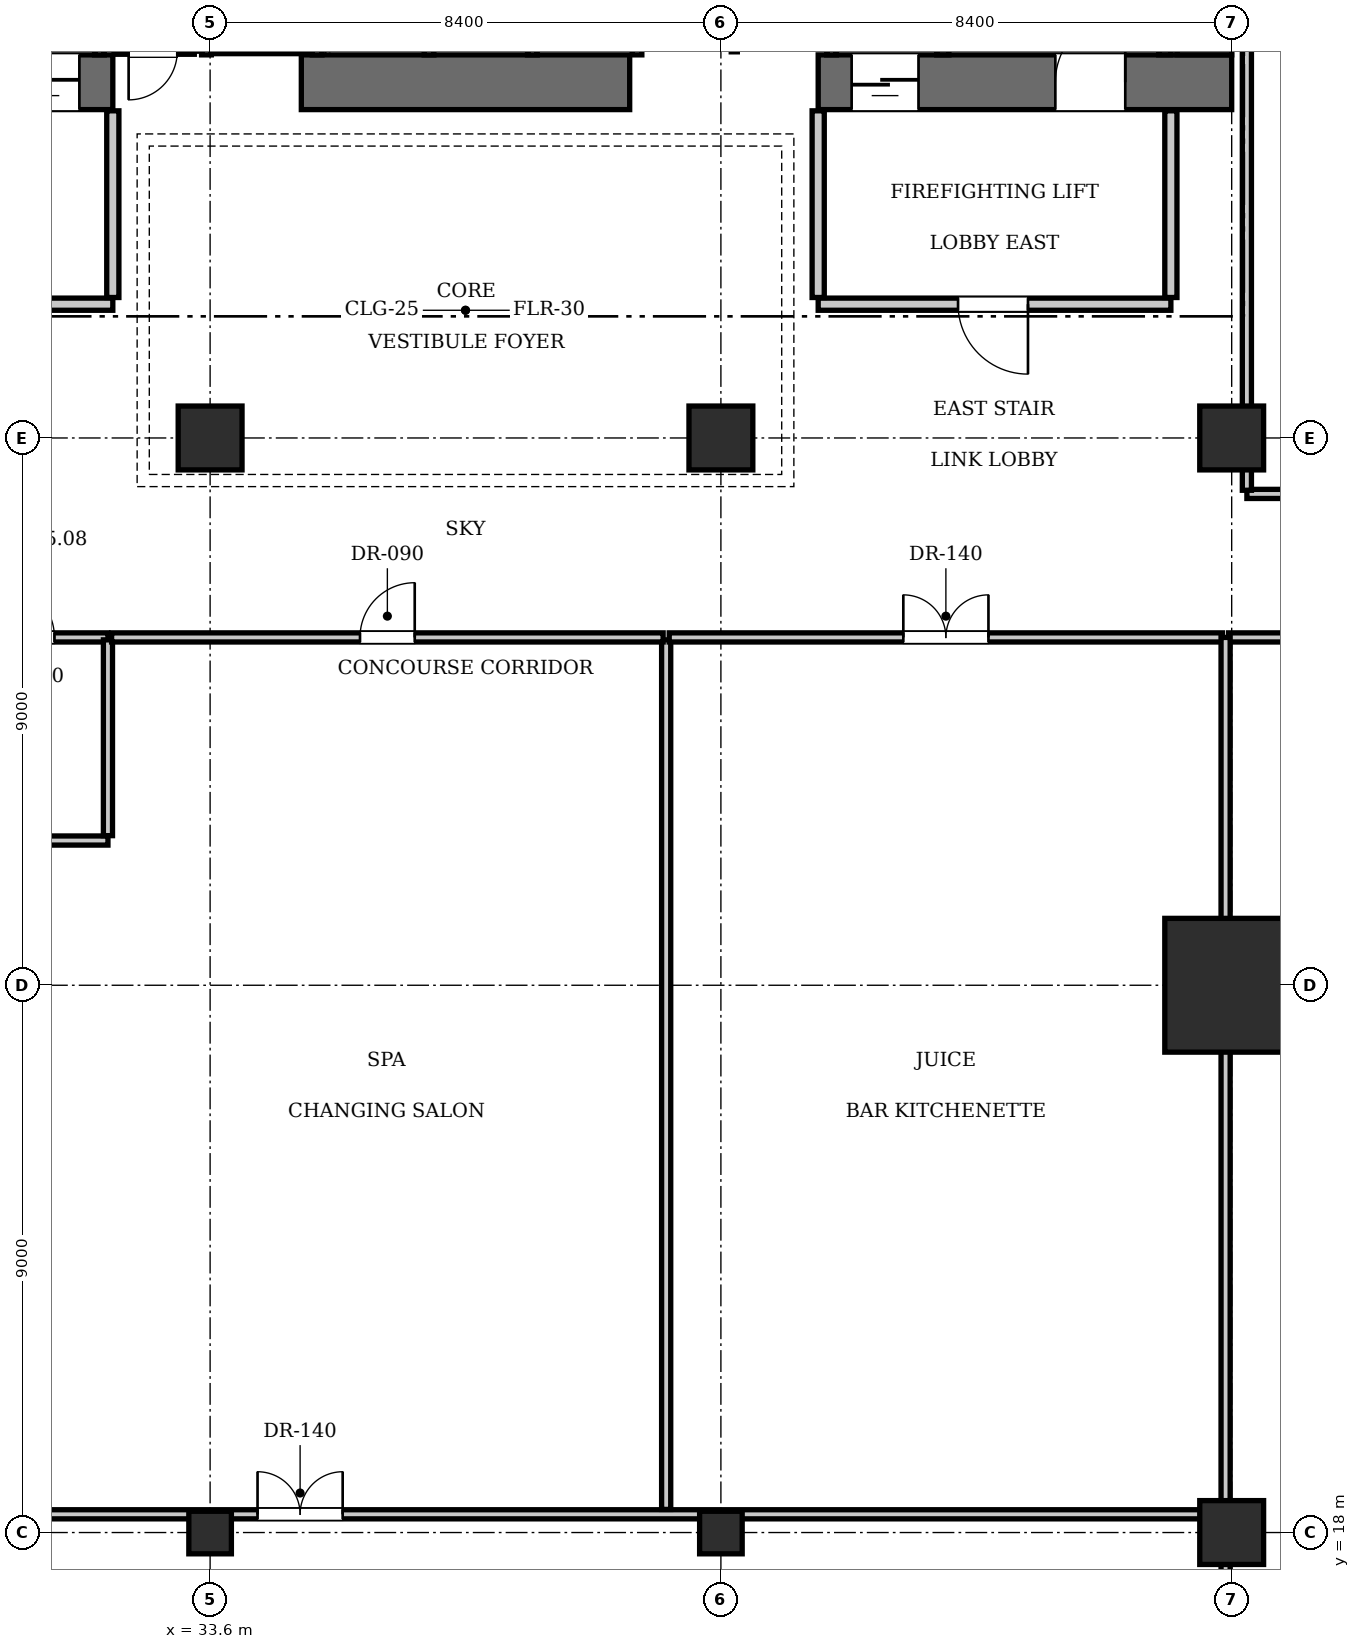
"""IFC4 building model, lengths in metres.
Left out: names, types, materials, properties, quantities, classifications, styles, units other than length and angle.
Written with IfcOpenShell. Run it as: python <this file> out.ifc"""

import sys

from ifc_helpers import new_model, si_unit, direction, frame, frame_2d, origin, origin_2d, place, context, subcontext, project, spatial, rectangle, i_section, extrude, element, fill, save


model = new_model("IFC4")
c1 = context("Model", 3, precision=1e-05, world=origin(), true_north=direction((0.0, 1.0)))
c2 = subcontext(c1, "Body", "Model", "MODEL_VIEW")
j1 = project(units=[si_unit("LENGTHUNIT", "METRE"), si_unit("PLANEANGLEUNIT", "RADIAN")], contexts=[c1])
p1 = place(None, origin())
s1 = spatial("IfcSite", under=j1, at=p1, CompositionType="ELEMENT")
p2 = place(p1, origin())
s2 = spatial("IfcBuilding", under=s1, at=p2, CompositionType="ELEMENT")
p3 = place(p2, frame((0.0, 0.0, 26.95)))
s3 = spatial("IfcBuildingStorey", under=s2, at=p3, CompositionType="ELEMENT", Elevation=26.95)
p4 = place(p3, frame((50.4, 27.0, 0.0), z_axis=(0.0, 0.0, 1.0), x_axis=(1.0, 0.0, 0.0)))
e1 = element("IfcColumn", 1, at=p4, inside=s3, PredefinedType="COLUMN", context=c2, shape_type="SweptSolid", body=[
    extrude(rectangle(XDim=2.2, YDim=2.2, at=origin_2d()), origin(), (0.0, 0.0, 1.0), 3.85),
])
p5 = place(p3, frame((25.2, 41.85, 0.0), z_axis=(0.0, 0.0, 1.0), x_axis=(1.0, 0.0, 0.0)))
e2 = element("IfcWall", 2, at=p5, inside=s3, PredefinedType="SHEAR", context=c2, shape_type="SweptSolid", body=[
    extrude(rectangle(XDim=6.8, YDim=0.9, at=frame_2d((3.4, 0.0))), origin(), (0.0, 0.0, 1.0), 3.85),
])
p6 = place(p5, frame((1.65, 0.0, 0.0)))
e3 = element("IfcOpeningElement", 3, at=p6, cuts=e2, PredefinedType="OPENING", context=c2, shape_type="SweptSolid", body=[
    extrude(rectangle(XDim=1.15, YDim=2.15, at=frame_2d((0.575, 1.075))), frame((0.0, 0.46, 0.0), z_axis=(0.0, -1.0, 0.0), x_axis=(1.0, 0.0, 0.0)), (0.0, 0.0, 1.0), 0.92),
])
p7 = place(p5, frame((5.15, 0.0, 0.0)))
e4 = element("IfcOpeningElement", 4, at=p7, cuts=e2, PredefinedType="OPENING", context=c2, shape_type="SweptSolid", body=[
    extrude(rectangle(XDim=1.1, YDim=2.2, at=frame_2d((0.55, 1.1))), frame((0.0, 0.46, 0.0), z_axis=(0.0, -1.0, 0.0), x_axis=(1.0, 0.0, 0.0)), (0.0, 0.0, 1.0), 0.92),
])
p8 = place(p3, frame((35.1, 41.85, 0.0), z_axis=(0.0, 0.0, 1.0), x_axis=(1.0, 0.0, 0.0)))
e5 = element("IfcWall", 5, at=p8, inside=s3, PredefinedType="SHEAR", context=c2, shape_type="SweptSolid", body=[
    extrude(rectangle(XDim=5.4, YDim=0.9, at=frame_2d((2.7, 0.0))), origin(), (0.0, 0.0, 1.0), 3.85),
])
p9 = place(p3, frame((43.6, 41.85, 0.0), z_axis=(0.0, 0.0, 1.0), x_axis=(1.0, 0.0, 0.0)))
e6 = element("IfcWall", 6, at=p9, inside=s3, PredefinedType="SHEAR", context=c2, shape_type="SweptSolid", body=[
    extrude(rectangle(XDim=6.8, YDim=0.9, at=frame_2d((3.4, 0.0))), origin(), (0.0, 0.0, 1.0), 3.85),
])
p10 = place(p9, frame((3.9, 0.0, 0.0)))
e7 = element("IfcOpeningElement", 7, at=p10, cuts=e6, PredefinedType="OPENING", context=c2, shape_type="SweptSolid", body=[
    extrude(rectangle(XDim=1.15, YDim=2.15, at=frame_2d((0.575, 1.075))), frame((0.0, 0.46, 0.0), z_axis=(0.0, -1.0, 0.0), x_axis=(1.0, 0.0, 0.0)), (0.0, 0.0, 1.0), 0.92),
])
p11 = place(p9, frame((0.55, 0.0, 0.0)))
e8 = element("IfcOpeningElement", 8, at=p11, cuts=e6, PredefinedType="OPENING", context=c2, shape_type="SweptSolid", body=[
    extrude(rectangle(XDim=1.1, YDim=2.2, at=frame_2d((0.55, 1.1))), frame((0.0, 0.46, 0.0), z_axis=(0.0, -1.0, 0.0), x_axis=(1.0, 0.0, 0.0)), (0.0, 0.0, 1.0), 0.92),
])
p12 = place(p3, frame((49.95, 42.3, 0.0), z_axis=(0.0, 0.0, 1.0), x_axis=(0.0, 1.0, 0.0)))
e9 = element("IfcWall", 9, at=p12, inside=s3, PredefinedType="SHEAR", context=c2, shape_type="SweptSolid", body=[
    extrude(rectangle(XDim=1.6, YDim=0.9, at=frame_2d((0.8, 0.0))), origin(), (0.0, 0.0, 1.0), 3.85),
])
for number, where, z_axis, x_axis in (
    (10, (33.6, 36.0, 0.0), (0.0, 0.0, 1.0), (1.0, 0.0, 0.0)),
    (11, (42.0, 36.0, 0.0), (0.0, 0.0, 1.0), (1.0, 0.0, 0.0)),
    (12, (50.4, 36.0, 0.0), (0.0, 0.0, 1.0), (1.0, 0.0, 0.0)),
    (13, (50.4, 18.0, 0.0), (0.0, 0.0, 1.0), (1.0, 0.0, 0.0)),
):
    element("IfcColumn", number, at=place(p3, frame(where, z_axis=z_axis, x_axis=x_axis)), inside=s3, PredefinedType="COLUMN", context=c2, shape_type="SweptSolid", body=[
        extrude(rectangle(XDim=1.05, YDim=1.05, at=origin_2d()), origin(), (0.0, 0.0, 1.0), 3.85),
    ])
for number, where, z_axis, x_axis in (
    (14, (33.6, 18.0, -0.24), (0.0, 0.0, 1.0), (1.0, 0.0, 0.0)),
    (15, (42.0, 18.0, -0.24), (0.0, 0.0, 1.0), (1.0, 0.0, 0.0)),
):
    element("IfcColumn", number, at=place(p3, frame(where, z_axis=z_axis, x_axis=x_axis)), inside=s3, PredefinedType="COLUMN", context=c2, shape_type="SweptSolid", body=[
        extrude(i_section(OverallWidth=0.7, OverallDepth=0.7, WebThickness=0.028, FlangeThickness=0.044, at=origin_2d()), origin(), (0.0, 0.0, 1.0), 4.09),
    ])
p13 = place(p3, frame((45.65, 42.3, 0.0), z_axis=(0.0, 0.0, 1.0), x_axis=(0.0, 1.0, 0.0)))
e16 = element("IfcWall", 16, at=p13, inside=s3, PredefinedType="SOLIDWALL", context=c2, shape_type="SweptSolid", body=[
    extrude(rectangle(XDim=8.85, YDim=0.2, at=frame_2d((4.425, 0.0))), origin(), (0.0, 0.0, 1.0), 3.61),
])
p14 = place(p3, frame((49.3, 42.3, 0.0), z_axis=(0.0, 0.0, 1.0), x_axis=(0.0, 1.0, 0.0)))
e17 = element("IfcWall", 17, at=p14, inside=s3, PredefinedType="SOLIDWALL", context=c2, shape_type="SweptSolid", body=[
    extrude(rectangle(XDim=1.58, YDim=0.2, at=frame_2d((0.79, 0.0))), origin(), (0.0, 0.0, 1.0), 3.61),
])
for number, where, z_axis, x_axis in (
    (18, (31.78, 42.3, 0.0), (0.0, 0.0, 1.0), (0.0, 1.0, 0.0)),
    (19, (43.82, 42.3, 0.0), (0.0, 0.0, 1.0), (0.0, 1.0, 0.0)),
):
    element("IfcWall", number, at=place(p3, frame(where, z_axis=z_axis, x_axis=x_axis)), inside=s3, PredefinedType="SOLIDWALL", context=c2, shape_type="SweptSolid", body=[
        extrude(rectangle(XDim=2.44, YDim=0.16, at=frame_2d((1.22, 0.0))), origin(), (0.0, 0.0, 1.0), 3.61),
    ])
for number, where, z_axis, x_axis in (
    (20, (37.2, 42.3, 0.0), (0.0, 0.0, 1.0), (0.0, 1.0, 0.0)),
    (21, (38.9, 42.3, 0.0), (0.0, 0.0, 1.0), (0.0, 1.0, 0.0)),
    (22, (40.62, 42.3, 0.0), (0.0, 0.0, 1.0), (0.0, 1.0, 0.0)),
):
    element("IfcWall", number, at=place(p3, frame(where, z_axis=z_axis, x_axis=x_axis)), inside=s3, PredefinedType="SOLIDWALL", context=c2, shape_type="SweptSolid", body=[
        extrude(rectangle(XDim=2.05, YDim=0.16, at=frame_2d((1.025, 0.0))), origin(), (0.0, 0.0, 1.0), 3.61),
    ])
for number, where, z_axis, x_axis in (
    (23, (33.54, 42.3, 0.0), (0.0, 0.0, 1.0), (0.0, 1.0, 0.0)),
    (24, (35.36, 42.3, 0.0), (0.0, 0.0, 1.0), (0.0, 1.0, 0.0)),
):
    element("IfcWall", number, at=place(p3, frame(where, z_axis=z_axis, x_axis=x_axis)), inside=s3, PredefinedType="SOLIDWALL", context=c2, shape_type="SweptSolid", body=[
        extrude(rectangle(XDim=2.1, YDim=0.16, at=frame_2d((1.05, 0.0))), origin(), (0.0, 0.0, 1.0), 3.61),
    ])
p15 = place(p3, frame((33.62, 42.4, 0.0), z_axis=(0.0, 0.0, 1.0), x_axis=(1.0, 0.0, 0.0)))
e25 = element("IfcWall", 25, at=p15, inside=s3, PredefinedType="SOLIDWALL", context=c2, shape_type="SweptSolid", body=[
    extrude(rectangle(XDim=1.66, YDim=0.16, at=frame_2d((0.83, 0.0))), origin(), (0.0, 0.0, 1.0), 3.61),
])
p16 = place(p3, frame((26.2, 38.2, 0.0), z_axis=(0.0, 0.0, 1.0), x_axis=(1.0, 0.0, 0.0)))
e26 = element("IfcWall", 26, at=p16, inside=s3, PredefinedType="PARTITIONING", context=c2, shape_type="SweptSolid", body=[
    extrude(rectangle(XDim=5.8, YDim=0.2, at=frame_2d((2.9, 0.0))), origin(), (0.0, 0.0, 1.0), 3.61),
])
p17 = place(p16, frame((2.3, 0.0, 0.0)))
e27 = element("IfcOpeningElement", 27, at=p17, cuts=e26, PredefinedType="OPENING", context=c2, shape_type="SweptSolid", body=[
    extrude(rectangle(XDim=1.15, YDim=2.15, at=frame_2d((0.575, 1.075))), frame((0.0, 0.11, 0.0), z_axis=(0.0, -1.0, 0.0), x_axis=(1.0, 0.0, 0.0)), (0.0, 0.0, 1.0), 0.22),
])
p18 = place(p3, frame((32.0, 38.31, 0.0), z_axis=(0.0, 0.0, 1.0), x_axis=(0.0, 1.0, 0.0)))
e28 = element("IfcWall", 28, at=p18, inside=s3, PredefinedType="PARTITIONING", context=c2, shape_type="SweptSolid", body=[
    extrude(rectangle(XDim=3.07, YDim=0.2, at=frame_2d((1.535, 0.0))), origin(), (0.0, 0.0, 1.0), 3.61),
])
p19 = place(p3, frame((43.6, 38.2, 0.0), z_axis=(0.0, 0.0, 1.0), x_axis=(1.0, 0.0, 0.0)))
e29 = element("IfcWall", 29, at=p19, inside=s3, PredefinedType="PARTITIONING", context=c2, shape_type="SweptSolid", body=[
    extrude(rectangle(XDim=5.8, YDim=0.2, at=frame_2d((2.9, 0.0))), origin(), (0.0, 0.0, 1.0), 3.61),
])
p20 = place(p19, frame((2.3, 0.0, 0.0)))
e30 = element("IfcOpeningElement", 30, at=p20, cuts=e29, PredefinedType="OPENING", context=c2, shape_type="SweptSolid", body=[
    extrude(rectangle(XDim=1.15, YDim=2.15, at=frame_2d((0.575, 1.075))), frame((0.0, 0.11, 0.0), z_axis=(0.0, -1.0, 0.0), x_axis=(1.0, 0.0, 0.0)), (0.0, 0.0, 1.0), 0.22),
])
for number, where, z_axis, x_axis in (
    (31, (43.6, 38.31, 0.0), (0.0, 0.0, 1.0), (0.0, 1.0, 0.0)),
    (32, (49.4, 38.31, 0.0), (0.0, 0.0, 1.0), (0.0, 1.0, 0.0)),
):
    element("IfcWall", number, at=place(p3, frame(where, z_axis=z_axis, x_axis=x_axis)), inside=s3, PredefinedType="PARTITIONING", context=c2, shape_type="SweptSolid", body=[
        extrude(rectangle(XDim=3.07, YDim=0.2, at=frame_2d((1.535, 0.0))), origin(), (0.0, 0.0, 1.0), 3.61),
    ])
p21 = place(p3, frame((32.02, 42.36, 0.0), z_axis=(0.0, 0.0, 1.0), x_axis=(1.0, 0.0, 0.0)))
e33 = element("IfcWall", 33, at=p21, inside=s3, PredefinedType="PARTITIONING", context=c2, shape_type="SweptSolid", body=[
    extrude(rectangle(XDim=1.32, YDim=0.1, at=frame_2d((0.66, 0.0))), origin(), (0.0, 0.0, 1.0), 3.61),
])
p22 = place(p21, frame((0.24, 0.0, 0.0)))
e34 = element("IfcOpeningElement", 34, at=p22, cuts=e33, PredefinedType="OPENING", context=c2, shape_type="SweptSolid", body=[
    extrude(rectangle(XDim=0.8, YDim=2.05, at=frame_2d((0.4, 1.025))), frame((0.0, 0.06, 0.0), z_axis=(0.0, -1.0, 0.0), x_axis=(1.0, 0.0, 0.0)), (0.0, 0.0, 1.0), 0.12),
])
p23 = place(p3, frame((29.26, 32.72, 0.0), z_axis=(0.0, 0.0, 1.0), x_axis=(1.0, 0.0, 0.0)))
e35 = element("IfcWall", 35, at=p23, inside=s3, PredefinedType="PARTITIONING", context=c2, shape_type="SweptSolid", body=[
    extrude(rectangle(XDim=2.66, YDim=0.15, at=frame_2d((1.33, 0.0))), origin(), (0.0, 0.0, 1.0), 3.61),
])
p24 = place(p23, frame((0.88, 0.0, 0.0)))
e36 = element("IfcOpeningElement", 36, at=p24, cuts=e35, PredefinedType="OPENING", context=c2, shape_type="SweptSolid", body=[
    extrude(rectangle(XDim=0.9, YDim=2.1, at=frame_2d((0.45, 1.05))), frame((0.0, 0.085, 0.0), z_axis=(0.0, -1.0, 0.0), x_axis=(1.0, 0.0, 0.0)), (0.0, 0.0, 1.0), 0.17),
])
p25 = place(p3, frame((25.38, 29.38, 0.0), z_axis=(0.0, 0.0, 1.0), x_axis=(1.0, 0.0, 0.0)))
e37 = element("IfcWall", 37, at=p25, inside=s3, PredefinedType="PARTITIONING", context=c2, shape_type="SweptSolid", body=[
    extrude(rectangle(XDim=6.54, YDim=0.15, at=frame_2d((3.27, 0.0))), origin(), (0.0, 0.0, 1.0), 3.61),
])
p26 = place(p3, frame((31.92, 29.46, 0.0), z_axis=(0.0, 0.0, 1.0), x_axis=(0.0, 1.0, 0.0)))
e38 = element("IfcWall", 38, at=p26, inside=s3, PredefinedType="PARTITIONING", context=c2, shape_type="SweptSolid", body=[
    extrude(rectangle(XDim=3.22, YDim=0.15, at=frame_2d((1.61, 0.0))), origin(), (0.0, 0.0, 1.0), 3.61),
])
p27 = place(p3, frame((25.38, 18.3, 0.0), z_axis=(0.0, 0.0, 1.0), x_axis=(1.0, 0.0, 0.0)))
e39 = element("IfcWall", 39, at=p27, inside=s3, PredefinedType="PARTITIONING", context=c2, shape_type="SweptSolid", body=[
    extrude(rectangle(XDim=24.84, YDim=0.15, at=frame_2d((12.42, 0.0))), origin(), (0.0, 0.0, 1.0), 3.61),
])
p28 = place(p27, frame((9.0, 0.0, 0.0)))
e40 = element("IfcOpeningElement", 40, at=p28, cuts=e39, PredefinedType="OPENING", context=c2, shape_type="SweptSolid", body=[
    extrude(rectangle(XDim=1.4, YDim=2.2, at=frame_2d((0.7, 1.1))), frame((0.0, 0.085, 0.0), z_axis=(0.0, -1.0, 0.0), x_axis=(1.0, 0.0, 0.0)), (0.0, 0.0, 1.0), 0.17),
])
p29 = place(p3, frame((41.1, 18.38, 0.0), z_axis=(0.0, 0.0, 1.0), x_axis=(0.0, 1.0, 0.0)))
e41 = element("IfcWall", 41, at=p29, inside=s3, PredefinedType="PARTITIONING", context=c2, shape_type="SweptSolid", body=[
    extrude(rectangle(XDim=14.3, YDim=0.15, at=frame_2d((7.15, 0.0))), origin(), (0.0, 0.0, 1.0), 3.61),
])
p30 = place(p3, frame((31.98, 32.72, 0.0), z_axis=(0.0, 0.0, 1.0), x_axis=(1.0, 0.0, 0.0)))
e42 = element("IfcWall", 42, at=p30, inside=s3, PredefinedType="PARTITIONING", context=c2, shape_type="SweptSolid", body=[
    extrude(rectangle(XDim=9.07, YDim=0.15, at=frame_2d((4.535, 0.0))), origin(), (0.0, 0.0, 1.0), 3.61),
])
p31 = place(p30, frame((4.085, 0.0, 0.0)))
e43 = element("IfcOpeningElement", 43, at=p31, cuts=e42, PredefinedType="OPENING", context=c2, shape_type="SweptSolid", body=[
    extrude(rectangle(XDim=0.9, YDim=2.1, at=frame_2d((0.45, 1.05))), frame((0.0, 0.085, 0.0), z_axis=(0.0, -1.0, 0.0), x_axis=(1.0, 0.0, 0.0)), (0.0, 0.0, 1.0), 0.17),
])
p32 = place(p3, frame((41.15, 32.72, 0.0), z_axis=(0.0, 0.0, 1.0), x_axis=(1.0, 0.0, 0.0)))
e44 = element("IfcWall", 44, at=p32, inside=s3, PredefinedType="PARTITIONING", context=c2, shape_type="SweptSolid", body=[
    extrude(rectangle(XDim=9.1, YDim=0.15, at=frame_2d((4.55, 0.0))), origin(), (0.0, 0.0, 1.0), 3.61),
])
p33 = place(p32, frame((3.85, 0.0, 0.0)))
e45 = element("IfcOpeningElement", 45, at=p33, cuts=e44, PredefinedType="OPENING", context=c2, shape_type="SweptSolid", body=[
    extrude(rectangle(XDim=1.4, YDim=2.2, at=frame_2d((0.7, 1.1))), frame((0.0, 0.085, 0.0), z_axis=(0.0, -1.0, 0.0), x_axis=(1.0, 0.0, 0.0)), (0.0, 0.0, 1.0), 0.17),
])
p34 = place(p3, frame((50.35, 32.72, 0.0), z_axis=(0.0, 0.0, 1.0), x_axis=(1.0, 0.0, 0.0)))
e46 = element("IfcWall", 46, at=p34, inside=s3, PredefinedType="PARTITIONING", context=c2, shape_type="SweptSolid", body=[
    extrude(rectangle(XDim=14.37, YDim=0.15, at=frame_2d((7.185, 0.0))), origin(), (0.0, 0.0, 1.0), 3.61),
])
p35 = place(p34, frame((6.485, 0.0, 0.0)))
e47 = element("IfcOpeningElement", 47, at=p35, cuts=e46, PredefinedType="OPENING", context=c2, shape_type="SweptSolid", body=[
    extrude(rectangle(XDim=1.4, YDim=2.2, at=frame_2d((0.7, 1.1))), frame((0.0, 0.085, 0.0), z_axis=(0.0, -1.0, 0.0), x_axis=(1.0, 0.0, 0.0)), (0.0, 0.0, 1.0), 0.17),
])
p36 = place(p3, frame((50.3, 0.08, 0.0), z_axis=(0.0, 0.0, 1.0), x_axis=(0.0, 1.0, 0.0)))
e48 = element("IfcWall", 48, at=p36, inside=s3, PredefinedType="PARTITIONING", context=c2, shape_type="SweptSolid", body=[
    extrude(rectangle(XDim=32.64, YDim=0.15, at=frame_2d((16.32, 0.0))), origin(), (0.0, 0.0, 1.0), 2.975),
])
p37 = place(p3, frame((50.65, 35.08, 0.0), z_axis=(0.0, 0.0, 1.0), x_axis=(1.0, 0.0, 0.0)))
e49 = element("IfcWall", 49, at=p37, inside=s3, PredefinedType="PARTITIONING", context=c2, shape_type="SweptSolid", body=[
    extrude(rectangle(XDim=14.07, YDim=0.15, at=frame_2d((7.035, 0.0))), origin(), (0.0, 0.0, 1.0), 3.61),
])
p38 = place(p37, frame((6.465, 0.0, 0.0)))
e50 = element("IfcOpeningElement", 50, at=p38, cuts=e49, PredefinedType="OPENING", context=c2, shape_type="SweptSolid", body=[
    extrude(rectangle(XDim=0.9, YDim=2.1, at=frame_2d((0.45, 1.05))), frame((0.0, 0.085, 0.0), z_axis=(0.0, -1.0, 0.0), x_axis=(1.0, 0.0, 0.0)), (0.0, 0.0, 1.0), 0.17),
])
p39 = place(p3, frame((50.65, 35.14, 0.0), z_axis=(0.0, 0.0, 1.0), x_axis=(0.0, 1.0, 0.0)))
e51 = element("IfcWall", 51, at=p39, inside=s3, PredefinedType="PARTITIONING", context=c2, shape_type="SweptSolid", body=[
    extrude(rectangle(XDim=18.78, YDim=0.15, at=frame_2d((9.39, 0.0))), origin(), (0.0, 0.0, 1.0), 3.61),
])
p40 = place(p10, origin())
e52 = element("IfcDoor", 52, at=p40, inside=s3, OperationType="SINGLE_SWING_RIGHT", PredefinedType="DOOR", context=c2, shape_type="SweptSolid", body=[
    extrude(rectangle(XDim=1.15, YDim=2.15, at=frame_2d((0.575, 1.075))), frame((0.0, 0.025, 0.0), z_axis=(0.0, -1.0, 0.0), x_axis=(1.0, 0.0, 0.0)), (0.0, 0.0, 1.0), 0.05),
])
fill(e7, e52)
p41 = place(p7, frame((1.1, 0.0, 0.0), z_axis=(0.0, 0.0, 1.0), x_axis=(-1.0, 0.0, 0.0)))
e53 = element("IfcDoor", 53, at=p41, inside=s3, OperationType="SLIDING_TO_LEFT", PredefinedType="DOOR", context=c2, shape_type="SweptSolid", body=[
    extrude(rectangle(XDim=1.1, YDim=2.2, at=frame_2d((0.55, 1.1))), frame((0.0, 0.025, 0.0), z_axis=(0.0, -1.0, 0.0), x_axis=(1.0, 0.0, 0.0)), (0.0, 0.0, 1.0), 0.05),
])
fill(e4, e53)
p42 = place(p11, frame((1.1, 0.0, 0.0), z_axis=(0.0, 0.0, 1.0), x_axis=(-1.0, 0.0, 0.0)))
e54 = element("IfcDoor", 54, at=p42, inside=s3, OperationType="SLIDING_TO_LEFT", PredefinedType="DOOR", context=c2, shape_type="SweptSolid", body=[
    extrude(rectangle(XDim=1.1, YDim=2.2, at=frame_2d((0.55, 1.1))), frame((0.0, 0.025, 0.0), z_axis=(0.0, -1.0, 0.0), x_axis=(1.0, 0.0, 0.0)), (0.0, 0.0, 1.0), 0.05),
])
fill(e8, e54)
p43 = place(p20, frame((1.15, 0.0, 0.0), z_axis=(0.0, 0.0, 1.0), x_axis=(-1.0, 0.0, 0.0)))
e55 = element("IfcDoor", 55, at=p43, inside=s3, OperationType="SINGLE_SWING_LEFT", PredefinedType="DOOR", context=c2, shape_type="SweptSolid", body=[
    extrude(rectangle(XDim=1.15, YDim=2.15, at=frame_2d((0.575, 1.075))), frame((0.0, 0.025, 0.0), z_axis=(0.0, -1.0, 0.0), x_axis=(1.0, 0.0, 0.0)), (0.0, 0.0, 1.0), 0.05),
])
fill(e30, e55)
p44 = place(p22, frame((0.8, 0.0, 0.0), z_axis=(0.0, 0.0, 1.0), x_axis=(-1.0, 0.0, 0.0)))
e56 = element("IfcDoor", 56, at=p44, inside=s3, OperationType="SINGLE_SWING_RIGHT", PredefinedType="DOOR", context=c2, shape_type="SweptSolid", body=[
    extrude(rectangle(XDim=0.8, YDim=2.05, at=frame_2d((0.4, 1.025))), frame((0.0, 0.025, 0.0), z_axis=(0.0, -1.0, 0.0), x_axis=(1.0, 0.0, 0.0)), (0.0, 0.0, 1.0), 0.05),
])
fill(e34, e56)
p45 = place(p24, origin())
e57 = element("IfcDoor", 57, at=p45, inside=s3, OperationType="SINGLE_SWING_LEFT", PredefinedType="DOOR", context=c2, shape_type="SweptSolid", body=[
    extrude(rectangle(XDim=0.9, YDim=2.1, at=frame_2d((0.45, 1.05))), frame((0.0, 0.025, 0.0), z_axis=(0.0, -1.0, 0.0), x_axis=(1.0, 0.0, 0.0)), (0.0, 0.0, 1.0), 0.05),
])
fill(e36, e57)
p46 = place(p28, origin())
e58 = element("IfcDoor", 58, at=p46, inside=s3, OperationType="DOUBLE_DOOR_SINGLE_SWING", PredefinedType="DOOR", context=c2, shape_type="SweptSolid", body=[
    extrude(rectangle(XDim=1.4, YDim=2.2, at=frame_2d((0.7, 1.1))), frame((0.0, 0.025, 0.0), z_axis=(0.0, -1.0, 0.0), x_axis=(1.0, 0.0, 0.0)), (0.0, 0.0, 1.0), 0.05),
])
fill(e40, e58)
p47 = place(p31, origin())
e59 = element("IfcDoor", 59, at=p47, inside=s3, OperationType="SINGLE_SWING_RIGHT", PredefinedType="DOOR", context=c2, shape_type="SweptSolid", body=[
    extrude(rectangle(XDim=0.9, YDim=2.1, at=frame_2d((0.45, 1.05))), frame((0.0, 0.025, 0.0), z_axis=(0.0, -1.0, 0.0), x_axis=(1.0, 0.0, 0.0)), (0.0, 0.0, 1.0), 0.05),
])
fill(e43, e59)
p48 = place(p33, origin())
e60 = element("IfcDoor", 60, at=p48, inside=s3, OperationType="DOUBLE_DOOR_SINGLE_SWING", PredefinedType="DOOR", context=c2, shape_type="SweptSolid", body=[
    extrude(rectangle(XDim=1.4, YDim=2.2, at=frame_2d((0.7, 1.1))), frame((0.0, 0.025, 0.0), z_axis=(0.0, -1.0, 0.0), x_axis=(1.0, 0.0, 0.0)), (0.0, 0.0, 1.0), 0.05),
])
fill(e45, e60)
save(model, sys.argv[1])
